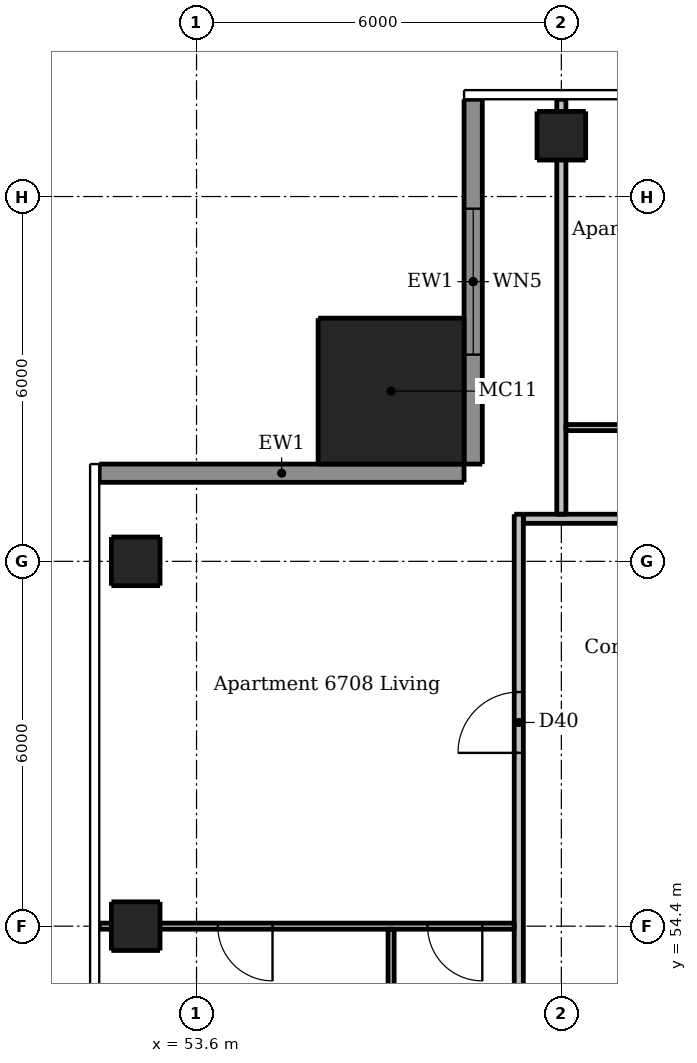
"""IFC4 building model, lengths in metres.
Left out: names, types, materials, properties, quantities, classifications, styles, units other than length and angle.
Written with IfcOpenShell. Run it as: python <this file> out.ifc"""

import sys

from ifc_helpers import new_model, si_unit, direction, frame, frame_2d, origin, origin_2d, place, context, subcontext, project, spatial, rectangle, extrude, element, fill, save


model = new_model("IFC4")
c1 = context("Model", 3, precision=1e-05, world=origin(), true_north=direction((0.0, 1.0)))
c2 = subcontext(c1, "Body", "Model", "MODEL_VIEW")
j1 = project(units=[si_unit("LENGTHUNIT", "METRE"), si_unit("PLANEANGLEUNIT", "RADIAN")], contexts=[c1])
p1 = place(None, origin())
s1 = spatial("IfcSite", under=j1, at=p1, CompositionType="ELEMENT")
p2 = place(p1, origin())
s2 = spatial("IfcBuilding", under=s1, at=p2, CompositionType="ELEMENT")
p3 = place(p2, frame((0.0, 0.0, 252.1)))
s3 = spatial("IfcBuildingStorey", under=s2, at=p3, CompositionType="ELEMENT", Elevation=252.1)
for number, where, z_axis, x_axis in (
    (1, (59.6, 67.4, 0.0), (0.0, 0.0, 1.0), (1.0, 0.0, 0.0)),
    (2, (52.6, 54.4, 0.0), (0.0, 0.0, 1.0), (1.0, 0.0, 0.0)),
    (3, (52.6, 60.4, 0.0), (0.0, 0.0, 1.0), (1.0, 0.0, 0.0)),
):
    element("IfcColumn", number, at=place(p3, frame(where, z_axis=z_axis, x_axis=x_axis)), inside=s3, PredefinedType="COLUMN", context=c2, shape_type="SweptSolid", body=[
        extrude(rectangle(XDim=0.8, YDim=0.8, at=origin_2d()), origin(), (0.0, 0.0, 1.0), 3.05),
    ])
p4 = place(p3, frame((56.8, 63.2, 0.0), z_axis=(0.0, 0.0, 1.0), x_axis=(1.0, 0.0, 0.0)))
e4 = element("IfcColumn", 4, at=p4, inside=s3, PredefinedType="COLUMN", context=c2, shape_type="SweptSolid", body=[
    extrude(rectangle(XDim=2.4, YDim=2.4, at=origin_2d()), origin(), (0.0, 0.0, 1.0), 3.3),
])
p5 = place(p3, frame((58.15, 68.0, 0.0), z_axis=(0.0, 0.0, 1.0), x_axis=(0.0, -1.0, 0.0)))
e5 = element("IfcWall", 5, at=p5, inside=s3, PredefinedType="SOLIDWALL", context=c2, shape_type="SweptSolid", body=[
    extrude(rectangle(XDim=6.0, YDim=0.3, at=frame_2d((3.0, 0.0))), origin(), (0.0, 0.0, 1.0), 3.05),
])
p6 = place(p5, frame((1.8, 0.0, 0.15)))
e6 = element("IfcOpeningElement", 6, at=p6, cuts=e5, PredefinedType="OPENING", context=c2, shape_type="SweptSolid", body=[
    extrude(rectangle(XDim=2.4, YDim=2.1, at=frame_2d((1.2, 1.05))), frame((0.0, 0.16, 0.0), z_axis=(0.0, -1.0, 0.0), x_axis=(1.0, 0.0, 0.0)), (0.0, 0.0, 1.0), 0.32),
])
p7 = place(p3, frame((58.0, 61.85, 0.0), z_axis=(0.0, 0.0, 1.0), x_axis=(-1.0, 0.0, 0.0)))
e7 = element("IfcWall", 7, at=p7, inside=s3, PredefinedType="SOLIDWALL", context=c2, shape_type="SweptSolid", body=[
    extrude(rectangle(XDim=6.0, YDim=0.3, at=frame_2d((3.0, 0.0))), origin(), (0.0, 0.0, 1.0), 3.05),
])
p8 = place(p3, frame((56.8, 54.35, 0.0), z_axis=(0.0, 0.0, 1.0), x_axis=(0.0, -1.0, 0.0)))
e8 = element("IfcWall", 8, at=p8, inside=s3, PredefinedType="PARTITIONING", context=c2, shape_type="SweptSolid", body=[
    extrude(rectangle(XDim=9.6, YDim=0.1, at=frame_2d((4.8, 0.0))), origin(), (0.0, 0.0, 1.0), 3.05),
])
p9 = place(p8, frame((7.35, 0.0, 0.0)))
e9 = element("IfcOpeningElement", 9, at=p9, cuts=e8, PredefinedType="OPENING", context=c2, shape_type="SweptSolid", body=[
    extrude(rectangle(XDim=0.8, YDim=2.1, at=frame_2d((0.4, 1.05))), frame((0.0, 0.06, 0.0), z_axis=(0.0, -1.0, 0.0), x_axis=(1.0, 0.0, 0.0)), (0.0, 0.0, 1.0), 0.12),
])
p10 = place(p8, frame((3.75, 0.0, 0.0)))
e10 = element("IfcOpeningElement", 10, at=p10, cuts=e8, PredefinedType="OPENING", context=c2, shape_type="SweptSolid", body=[
    extrude(rectangle(XDim=0.8, YDim=2.1, at=frame_2d((0.4, 1.05))), frame((0.0, 0.06, 0.0), z_axis=(0.0, -1.0, 0.0), x_axis=(1.0, 0.0, 0.0)), (0.0, 0.0, 1.0), 0.12),
])
p11 = place(p3, frame((59.675, 62.6, 0.0), z_axis=(0.0, 0.0, 1.0), x_axis=(1.0, 0.0, 0.0)))
e11 = element("IfcWall", 11, at=p11, inside=s3, PredefinedType="PARTITIONING", context=c2, shape_type="SweptSolid", body=[
    extrude(rectangle(XDim=17.85, YDim=0.1, at=frame_2d((8.925, 0.0))), origin(), (0.0, 0.0, 1.0), 3.05),
])
p12 = place(p11, frame((12.375, 0.0, 0.0)))
e12 = element("IfcOpeningElement", 12, at=p12, cuts=e11, PredefinedType="OPENING", context=c2, shape_type="SweptSolid", body=[
    extrude(rectangle(XDim=0.9, YDim=2.1, at=frame_2d((0.45, 1.05))), frame((0.0, 0.06, 0.0), z_axis=(0.0, -1.0, 0.0), x_axis=(1.0, 0.0, 0.0)), (0.0, 0.0, 1.0), 0.12),
])
p13 = place(p11, frame((16.275, 0.0, 0.0)))
e13 = element("IfcOpeningElement", 13, at=p13, cuts=e11, PredefinedType="OPENING", context=c2, shape_type="SweptSolid", body=[
    extrude(rectangle(XDim=0.9, YDim=2.1, at=frame_2d((0.45, 1.05))), frame((0.0, 0.06, 0.0), z_axis=(0.0, -1.0, 0.0), x_axis=(1.0, 0.0, 0.0)), (0.0, 0.0, 1.0), 0.12),
])
p14 = place(p11, frame((14.175, 0.0, 0.0)))
e14 = element("IfcOpeningElement", 14, at=p14, cuts=e11, PredefinedType="OPENING", context=c2, shape_type="SweptSolid", body=[
    extrude(rectangle(XDim=0.9, YDim=2.1, at=frame_2d((0.45, 1.05))), frame((0.0, 0.06, 0.0), z_axis=(0.0, -1.0, 0.0), x_axis=(1.0, 0.0, 0.0)), (0.0, 0.0, 1.0), 0.12),
])
p15 = place(p11, frame((1.275, 0.0, 0.0)))
e15 = element("IfcOpeningElement", 15, at=p15, cuts=e11, PredefinedType="OPENING", context=c2, shape_type="SweptSolid", body=[
    extrude(rectangle(XDim=0.9, YDim=2.1, at=frame_2d((0.45, 1.05))), frame((0.0, 0.06, 0.0), z_axis=(0.0, -1.0, 0.0), x_axis=(1.0, 0.0, 0.0)), (0.0, 0.0, 1.0), 0.12),
])
p16 = place(p11, frame((7.275, 0.0, 0.0)))
e16 = element("IfcOpeningElement", 16, at=p16, cuts=e11, PredefinedType="OPENING", context=c2, shape_type="SweptSolid", body=[
    extrude(rectangle(XDim=0.9, YDim=2.1, at=frame_2d((0.45, 1.05))), frame((0.0, 0.06, 0.0), z_axis=(0.0, -1.0, 0.0), x_axis=(1.0, 0.0, 0.0)), (0.0, 0.0, 1.0), 0.12),
])
p17 = place(p11, frame((4.325, 0.0, 0.0)))
e17 = element("IfcOpeningElement", 17, at=p17, cuts=e11, PredefinedType="OPENING", context=c2, shape_type="SweptSolid", body=[
    extrude(rectangle(XDim=0.8, YDim=2.1, at=frame_2d((0.4, 1.05))), frame((0.0, 0.06, 0.0), z_axis=(0.0, -1.0, 0.0), x_axis=(1.0, 0.0, 0.0)), (0.0, 0.0, 1.0), 0.12),
])
p18 = place(p11, frame((10.325, 0.0, 0.0)))
e18 = element("IfcOpeningElement", 18, at=p18, cuts=e11, PredefinedType="OPENING", context=c2, shape_type="SweptSolid", body=[
    extrude(rectangle(XDim=0.8, YDim=2.1, at=frame_2d((0.4, 1.05))), frame((0.0, 0.06, 0.0), z_axis=(0.0, -1.0, 0.0), x_axis=(1.0, 0.0, 0.0)), (0.0, 0.0, 1.0), 0.12),
])
p19 = place(p3, frame((58.825, 54.4, 0.0), z_axis=(0.0, 0.0, 1.0), x_axis=(-1.0, 0.0, 0.0)))
e19 = element("IfcWall", 19, at=p19, inside=s3, PredefinedType="PARTITIONING", context=c2, shape_type="SweptSolid", body=[
    extrude(rectangle(XDim=6.825, YDim=0.1, at=frame_2d((3.413, 0.0))), origin(), (0.0, 0.0, 1.0), 2.516),
])
p20 = place(p19, frame((0.525, 0.0, 0.0)))
e20 = element("IfcOpeningElement", 20, at=p20, cuts=e19, PredefinedType="OPENING", context=c2, shape_type="SweptSolid", body=[
    extrude(rectangle(XDim=0.9, YDim=2.1, at=frame_2d((0.45, 1.05))), frame((0.0, 0.06, 0.0), z_axis=(0.0, -1.0, 0.0), x_axis=(1.0, 0.0, 0.0)), (0.0, 0.0, 1.0), 0.12),
])
p21 = place(p19, frame((3.975, 0.0, 0.0)))
e21 = element("IfcOpeningElement", 21, at=p21, cuts=e19, PredefinedType="OPENING", context=c2, shape_type="SweptSolid", body=[
    extrude(rectangle(XDim=0.9, YDim=2.1, at=frame_2d((0.45, 1.05))), frame((0.0, 0.06, 0.0), z_axis=(0.0, -1.0, 0.0), x_axis=(1.0, 0.0, 0.0)), (0.0, 0.0, 1.0), 0.12),
])
p22 = place(p3, frame((58.9, 30.325, 0.0), z_axis=(0.0, 0.0, 1.0), x_axis=(0.0, 1.0, 0.0)))
e22 = element("IfcWall", 22, at=p22, inside=s3, PredefinedType="PARTITIONING", context=c2, shape_type="SweptSolid", body=[
    extrude(rectangle(XDim=30.85, YDim=0.15, at=frame_2d((15.425, 0.0))), origin(), (0.0, 0.0, 1.0), 3.05),
])
p23 = place(p22, frame((7.375, 0.0, 0.0)))
e23 = element("IfcOpeningElement", 23, at=p23, cuts=e22, PredefinedType="OPENING", context=c2, shape_type="SweptSolid", body=[
    extrude(rectangle(XDim=1.0, YDim=2.1, at=frame_2d((0.5, 1.05))), frame((0.0, 0.085, 0.0), z_axis=(0.0, -1.0, 0.0), x_axis=(1.0, 0.0, 0.0)), (0.0, 0.0, 1.0), 0.17),
])
p24 = place(p22, frame((26.925, 0.0, 0.0)))
e24 = element("IfcOpeningElement", 24, at=p24, cuts=e22, PredefinedType="OPENING", context=c2, shape_type="SweptSolid", body=[
    extrude(rectangle(XDim=1.0, YDim=2.1, at=frame_2d((0.5, 1.05))), frame((0.0, 0.085, 0.0), z_axis=(0.0, -1.0, 0.0), x_axis=(1.0, 0.0, 0.0)), (0.0, 0.0, 1.0), 0.17),
])
p25 = place(p3, frame((59.6, 61.175, 0.0), z_axis=(0.0, 0.0, 1.0), x_axis=(0.0, 1.0, 0.0)))
e25 = element("IfcWall", 25, at=p25, inside=s3, PredefinedType="PARTITIONING", context=c2, shape_type="SweptSolid", body=[
    extrude(rectangle(XDim=6.825, YDim=0.15, at=frame_2d((3.413, 0.0))), origin(), (0.0, 0.0, 1.0), 2.51),
])
p26 = place(p3, frame((58.975, 61.1, 0.0), z_axis=(0.0, 0.0, 1.0), x_axis=(1.0, 0.0, 0.0)))
e26 = element("IfcWall", 26, at=p26, inside=s3, PredefinedType="PARTITIONING", context=c2, shape_type="SweptSolid", body=[
    extrude(rectangle(XDim=29.25, YDim=0.15, at=frame_2d((14.625, 0.0))), origin(), (0.0, 0.0, 1.0), 3.05),
])
p27 = place(p26, frame((9.125, 0.0, 0.0)))
e27 = element("IfcOpeningElement", 27, at=p27, cuts=e26, PredefinedType="OPENING", context=c2, shape_type="SweptSolid", body=[
    extrude(rectangle(XDim=1.0, YDim=2.1, at=frame_2d((0.5, 1.05))), frame((0.0, 0.085, 0.0), z_axis=(0.0, -1.0, 0.0), x_axis=(1.0, 0.0, 0.0)), (0.0, 0.0, 1.0), 0.17),
])
p28 = place(p26, frame((26.475, 0.0, 0.0)))
e28 = element("IfcOpeningElement", 28, at=p28, cuts=e26, PredefinedType="OPENING", context=c2, shape_type="SweptSolid", body=[
    extrude(rectangle(XDim=1.0, YDim=2.1, at=frame_2d((0.5, 1.05))), frame((0.0, 0.085, 0.0), z_axis=(0.0, -1.0, 0.0), x_axis=(1.0, 0.0, 0.0)), (0.0, 0.0, 1.0), 0.17),
])
p29 = place(p6, origin())
e29 = element("IfcWindow", 29, at=p29, inside=s3, PartitioningType="DOUBLE_PANEL_VERTICAL", PredefinedType="WINDOW", context=c2, shape_type="SweptSolid", body=[
    extrude(rectangle(XDim=2.4, YDim=2.1, at=frame_2d((1.2, 1.05))), frame((0.0, 0.03, 0.0), z_axis=(0.0, -1.0, 0.0), x_axis=(1.0, 0.0, 0.0)), (0.0, 0.0, 1.0), 0.06),
])
fill(e6, e29)
p30 = place(p24, origin())
e30 = element("IfcDoor", 30, at=p30, inside=s3, OperationType="SINGLE_SWING_LEFT", PredefinedType="DOOR", context=c2, shape_type="SweptSolid", body=[
    extrude(rectangle(XDim=1.0, YDim=2.1, at=frame_2d((0.5, 1.05))), frame((0.0, 0.025, 0.0), z_axis=(0.0, -1.0, 0.0), x_axis=(1.0, 0.0, 0.0)), (0.0, 0.0, 1.0), 0.05),
])
fill(e24, e30)
p31 = place(p20, origin())
e31 = element("IfcDoor", 31, at=p31, inside=s3, OperationType="SINGLE_SWING_LEFT", PredefinedType="DOOR", context=c2, shape_type="SweptSolid", body=[
    extrude(rectangle(XDim=0.9, YDim=2.1, at=frame_2d((0.45, 1.05))), frame((0.0, 0.025, 0.0), z_axis=(0.0, -1.0, 0.0), x_axis=(1.0, 0.0, 0.0)), (0.0, 0.0, 1.0), 0.05),
])
fill(e20, e31)
p32 = place(p21, origin())
e32 = element("IfcDoor", 32, at=p32, inside=s3, OperationType="SINGLE_SWING_LEFT", PredefinedType="DOOR", context=c2, shape_type="SweptSolid", body=[
    extrude(rectangle(XDim=0.9, YDim=2.1, at=frame_2d((0.45, 1.05))), frame((0.0, 0.025, 0.0), z_axis=(0.0, -1.0, 0.0), x_axis=(1.0, 0.0, 0.0)), (0.0, 0.0, 1.0), 0.05),
])
fill(e21, e32)
save(model, sys.argv[1])
